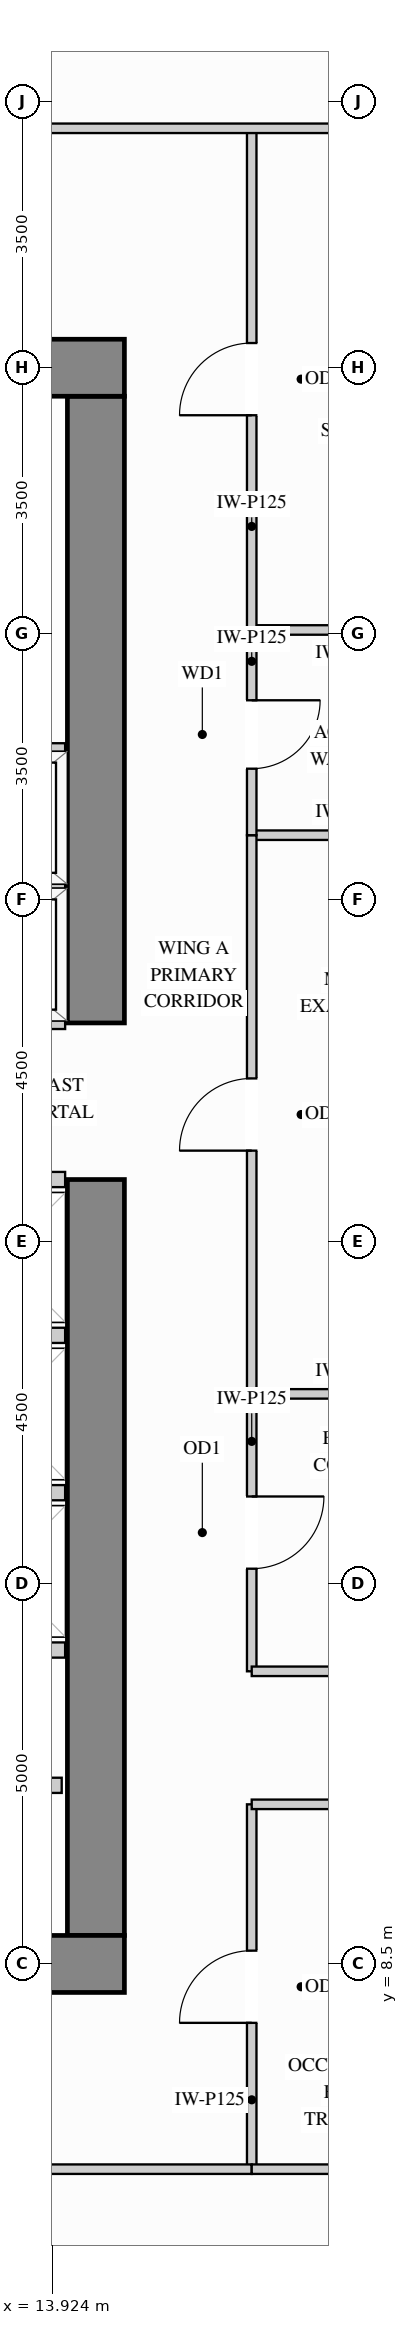
"""IFC4 building model, lengths in metres.
Left out: names, types, materials, properties, quantities, classifications, styles, units other than length and angle.
Written with IfcOpenShell. Run it as: python <this file> out.ifc"""

import sys

from ifc_helpers import new_model, si_unit, direction, frame, frame_2d, origin, place, context, subcontext, project, spatial, rectangle, extrude, source, transform, mapped, element, fill, save


model = new_model("IFC4")
c1 = context("Model", 3, precision=1e-05, world=origin(), true_north=direction((0.0, 1.0)))
c2 = subcontext(c1, "Body", "Model", "MODEL_VIEW")
j1 = project(units=[si_unit("LENGTHUNIT", "METRE"), si_unit("PLANEANGLEUNIT", "RADIAN")], contexts=[c1])
p1 = place(None, origin())
s1 = spatial("IfcSite", under=j1, at=p1, CompositionType="ELEMENT")
p2 = place(p1, origin())
s2 = spatial("IfcBuilding", under=s1, at=p2, CompositionType="ELEMENT")
p3 = place(p2, frame((0.0, 0.0, 117.0)))
s3 = spatial("IfcBuildingStorey", under=s2, at=p3, CompositionType="ELEMENT", Elevation=117.0)
m1 = source(origin(), c2, "Body", "SweptSolid", [
    extrude(rectangle(XDim=9.945, YDim=0.75, at=frame_2d((4.973, 0.0))), origin(), (0.0, 0.0, 1.0), 3.38),
])
p4 = place(p3, frame((14.5, 8.875, 0.0), z_axis=(0.0, 0.0, 1.0), x_axis=(0.0, 1.0, 0.0)))
e1 = element("IfcWall", 1, at=p4, inside=s3, PredefinedType="SHEAR", context=c2, shape_type="MappedRepresentation", body=[
    mapped(m1, transform((0.0, 0.0, 0.0), x_axis=(1.0, 0.0, 0.0), y_axis=(0.0, 1.0, 0.0), z_axis=(0.0, 0.0, 1.0))),
])
m2 = source(origin(), c2, "Body", "SweptSolid", [
    extrude(rectangle(XDim=8.245, YDim=0.75, at=frame_2d((4.123, 0.0))), origin(), (0.0, 0.0, 1.0), 3.38),
])
p5 = place(p3, frame((14.5, 20.88, 0.0), z_axis=(0.0, 0.0, 1.0), x_axis=(0.0, 1.0, 0.0)))
e2 = element("IfcWall", 2, at=p5, inside=s3, PredefinedType="SHEAR", context=c2, shape_type="MappedRepresentation", body=[
    mapped(m2, transform((0.0, 0.0, 0.0), x_axis=(1.0, 0.0, 0.0), y_axis=(0.0, 1.0, 0.0), z_axis=(0.0, 0.0, 1.0))),
])
m3 = source(origin(), c2, "Body", "SweptSolid", [
    extrude(rectangle(XDim=10.75, YDim=0.75, at=frame_2d((5.375, 0.0))), origin(), (0.0, 0.0, 1.0), 3.38),
])
for number, where, z_axis, x_axis in (
    (3, (4.125, 29.5, 0.0), (0.0, 0.0, 1.0), (1.0, 0.0, 0.0)),
    (4, (4.125, 8.5, 0.0), (0.0, 0.0, 1.0), (1.0, 0.0, 0.0)),
):
    element("IfcWall", number, at=place(p3, frame(where, z_axis=z_axis, x_axis=x_axis)), inside=s3, PredefinedType="SHEAR", context=c2, shape_type="MappedRepresentation", body=[
        mapped(m3, transform((0.0, 0.0, 0.0), x_axis=(1.0, 0.0, 0.0), y_axis=(0.0, 1.0, 0.0), z_axis=(0.0, 0.0, 1.0))),
    ])
m4 = source(origin(), c2, "Body", "SweptSolid", [
    extrude(rectangle(XDim=2.6, YDim=0.125, at=frame_2d((1.3, 0.0))), origin(), (0.0, 0.0, 1.0), 3.365),
])
p6 = place(p3, frame((16.55, 16.0, 0.0), z_axis=(0.0, 0.0, 1.0), x_axis=(1.0, 0.0, 0.0)))
e5 = element("IfcWall", 5, at=p6, inside=s3, PredefinedType="PARTITIONING", context=c2, shape_type="MappedRepresentation", body=[
    mapped(m4, transform((0.0, 0.0, 0.0), x_axis=(1.0, 0.0, 0.0), y_axis=(0.0, 1.0, 0.0), z_axis=(0.0, 0.0, 1.0))),
])
m5 = source(origin(), c2, "Body", "SweptSolid", [
    extrude(rectangle(XDim=2.598, YDim=0.125, at=frame_2d((1.299, 0.0))), origin(), (0.0, 0.0, 1.0), 3.365),
])
for number, where, z_axis, x_axis in (
    (6, (16.55, 23.35, 0.0), (0.0, 0.0, 1.0), (1.0, 0.0, 0.0)),
    (7, (16.55, 26.05, 0.0), (0.0, 0.0, 1.0), (1.0, 0.0, 0.0)),
):
    element("IfcWall", number, at=place(p3, frame(where, z_axis=z_axis, x_axis=x_axis)), inside=s3, PredefinedType="PARTITIONING", context=c2, shape_type="MappedRepresentation", body=[
        mapped(m5, transform((0.0, 0.0, 0.0), x_axis=(1.0, 0.0, 0.0), y_axis=(0.0, 1.0, 0.0), z_axis=(0.0, 0.0, 1.0))),
    ])
p7 = place(p3, frame((16.55, 12.35, 0.0), z_axis=(0.0, 0.0, 1.0), x_axis=(0.0, 1.0, 0.0)))
e8 = element("IfcWall", 8, at=p7, inside=s3, PredefinedType="PARTITIONING", context=c2, shape_type="SweptSolid", body=[
    extrude(rectangle(XDim=3.65, YDim=0.125, at=frame_2d((1.825, 0.0))), origin(), (0.0, 0.0, 1.0), 3.365),
])
p8 = place(p7, frame((1.35, 0.0, 0.0)))
e9 = element("IfcOpeningElement", 9, at=p8, cuts=e8, PredefinedType="OPENING", context=c2, shape_type="SweptSolid", body=[
    extrude(rectangle(XDim=0.95, YDim=2.15, at=frame_2d((0.475, 1.075))), frame((0.0, 0.073, 0.0), z_axis=(0.0, -1.0, 0.0), x_axis=(1.0, 0.0, 0.0)), (0.0, 0.0, 1.0), 0.145),
])
p9 = place(p3, frame((16.55, 16.0, 0.0), z_axis=(0.0, 0.0, 1.0), x_axis=(0.0, 1.0, 0.0)))
e10 = element("IfcWall", 10, at=p9, inside=s3, PredefinedType="PARTITIONING", context=c2, shape_type="SweptSolid", body=[
    extrude(rectangle(XDim=7.35, YDim=0.125, at=frame_2d((3.675, 0.0))), origin(), (0.0, 0.0, 1.0), 3.365),
])
p10 = place(p9, frame((3.2, 0.0, 0.0)))
e11 = element("IfcOpeningElement", 11, at=p10, cuts=e10, PredefinedType="OPENING", context=c2, shape_type="SweptSolid", body=[
    extrude(rectangle(XDim=0.95, YDim=2.15, at=frame_2d((0.475, 1.075))), frame((0.0, 0.073, 0.0), z_axis=(0.0, -1.0, 0.0), x_axis=(1.0, 0.0, 0.0)), (0.0, 0.0, 1.0), 0.145),
])
p11 = place(p3, frame((16.55, 26.05, 0.0), z_axis=(0.0, 0.0, 1.0), x_axis=(0.0, 1.0, 0.0)))
e12 = element("IfcWall", 12, at=p11, inside=s3, PredefinedType="PARTITIONING", context=c2, shape_type="SweptSolid", body=[
    extrude(rectangle(XDim=6.6, YDim=0.125, at=frame_2d((3.3, 0.0))), origin(), (0.0, 0.0, 1.0), 3.365),
])
p12 = place(p11, frame((2.825, 0.0, 0.0)))
e13 = element("IfcOpeningElement", 13, at=p12, cuts=e12, PredefinedType="OPENING", context=c2, shape_type="SweptSolid", body=[
    extrude(rectangle(XDim=0.95, YDim=2.15, at=frame_2d((0.475, 1.075))), frame((0.0, 0.073, 0.0), z_axis=(0.0, -1.0, 0.0), x_axis=(1.0, 0.0, 0.0)), (0.0, 0.0, 1.0), 0.145),
])
p13 = place(p3, frame((16.55, 5.8, 0.0), z_axis=(0.0, 0.0, 1.0), x_axis=(0.0, 1.0, 0.0)))
e14 = element("IfcWall", 14, at=p13, inside=s3, PredefinedType="PARTITIONING", context=c2, shape_type="SweptSolid", body=[
    extrude(rectangle(XDim=4.8, YDim=0.125, at=frame_2d((2.4, 0.0))), origin(), (0.0, 0.0, 1.0), 3.365),
])
p14 = place(p13, frame((1.925, 0.0, 0.0)))
e15 = element("IfcOpeningElement", 15, at=p14, cuts=e14, PredefinedType="OPENING", context=c2, shape_type="SweptSolid", body=[
    extrude(rectangle(XDim=0.95, YDim=2.15, at=frame_2d((0.475, 1.075))), frame((0.0, 0.073, 0.0), z_axis=(0.0, -1.0, 0.0), x_axis=(1.0, 0.0, 0.0)), (0.0, 0.0, 1.0), 0.145),
])
p15 = place(p3, frame((16.55, 23.35, 0.0), z_axis=(0.0, 0.0, 1.0), x_axis=(0.0, 1.0, 0.0)))
e16 = element("IfcWall", 16, at=p15, inside=s3, PredefinedType="PARTITIONING", context=c2, shape_type="SweptSolid", body=[
    extrude(rectangle(XDim=2.7, YDim=0.125, at=frame_2d((1.35, 0.0))), origin(), (0.0, 0.0, 1.0), 3.365),
])
p16 = place(p15, frame((0.875, 0.0, 0.0)))
e17 = element("IfcOpeningElement", 17, at=p16, cuts=e16, PredefinedType="OPENING", context=c2, shape_type="SweptSolid", body=[
    extrude(rectangle(XDim=0.9, YDim=2.15, at=frame_2d((0.45, 1.075))), frame((0.0, 0.073, 0.0), z_axis=(0.0, -1.0, 0.0), x_axis=(1.0, 0.0, 0.0)), (0.0, 0.0, 1.0), 0.145),
])
m6 = source(origin(), c2, "Body", "SweptSolid", [
    extrude(rectangle(XDim=5.798, YDim=0.125, at=frame_2d((2.899, 0.0))), origin(), (0.0, 0.0, 1.0), 3.365),
])
p17 = place(p3, frame((13.35, 32.65, 0.0), z_axis=(0.0, 0.0, 1.0), x_axis=(1.0, 0.0, 0.0)))
e18 = element("IfcWall", 18, at=p17, inside=s3, PredefinedType="PARTITIONING", context=c2, shape_type="MappedRepresentation", body=[
    mapped(m6, transform((0.0, 0.0, 0.0), x_axis=(1.0, 0.0, 0.0), y_axis=(0.0, 1.0, 0.0), z_axis=(0.0, 0.0, 1.0))),
])
m7 = source(origin(), c2, "Body", "SweptSolid", [
    extrude(rectangle(XDim=2.95, YDim=0.125, at=frame_2d((1.475, 0.0))), origin(), (0.0, 0.0, 1.0), 3.365),
])
for number, where, z_axis, x_axis in (
    (19, (16.55, 12.35, 0.0), (0.0, 0.0, 1.0), (1.0, 0.0, 0.0)),
    (20, (16.55, 10.6, 0.0), (0.0, 0.0, 1.0), (1.0, 0.0, 0.0)),
):
    element("IfcWall", number, at=place(p3, frame(where, z_axis=z_axis, x_axis=x_axis)), inside=s3, PredefinedType="PARTITIONING", context=c2, shape_type="MappedRepresentation", body=[
        mapped(m7, transform((0.0, 0.0, 0.0), x_axis=(1.0, 0.0, 0.0), y_axis=(0.0, 1.0, 0.0), z_axis=(0.0, 0.0, 1.0))),
    ])
p18 = place(p3, frame((9.882, 5.8, 0.0), z_axis=(0.0, 0.0, 1.0), x_axis=(1.0, 0.0, 0.0)))
e21 = element("IfcWall", 21, at=p18, inside=s3, PredefinedType="PARTITIONING", context=c2, shape_type="SweptSolid", body=[
    extrude(rectangle(XDim=6.668, YDim=0.125, at=frame_2d((3.334, 0.0))), origin(), (0.0, 0.0, 1.0), 3.365),
])
p19 = place(p18, frame((2.859, 0.0, 0.0)))
e22 = element("IfcOpeningElement", 22, at=p19, cuts=e21, PredefinedType="OPENING", context=c2, shape_type="SweptSolid", body=[
    extrude(rectangle(XDim=0.95, YDim=2.15, at=frame_2d((0.475, 1.075))), frame((0.0, 0.073, 0.0), z_axis=(0.0, -1.0, 0.0), x_axis=(1.0, 0.0, 0.0)), (0.0, 0.0, 1.0), 0.145),
])
p20 = place(p3, frame((16.55, 5.8, 0.0), z_axis=(0.0, 0.0, 1.0), x_axis=(1.0, 0.0, 0.0)))
e23 = element("IfcWall", 23, at=p20, inside=s3, PredefinedType="PARTITIONING", context=c2, shape_type="MappedRepresentation", body=[
    mapped(m5, transform((0.0, 0.0, 0.0), x_axis=(1.0, 0.0, 0.0), y_axis=(0.0, 1.0, 0.0), z_axis=(0.0, 0.0, 1.0))),
])
m8 = source(origin(), c2, "Body", "SweptSolid", [
    extrude(rectangle(XDim=1.63, YDim=0.2, at=frame_2d((0.815, 0.0))), origin(), (0.0, 0.0, 1.0), 3.365),
])
p21 = place(p3, frame((12.42, 10.85, 0.0), z_axis=(0.0, 0.0, 1.0), x_axis=(1.0, 0.0, 0.0)))
e24 = element("IfcWall", 24, at=p21, inside=s3, PredefinedType="PARTITIONING", context=c2, shape_type="MappedRepresentation", body=[
    mapped(m8, transform((0.0, 0.0, 0.0), x_axis=(1.0, 0.0, 0.0), y_axis=(0.0, 1.0, 0.0), z_axis=(0.0, 0.0, 1.0))),
])
m9 = source(origin(), c2, "Body", "SweptSolid", [
    extrude(rectangle(XDim=2.265, YDim=0.2, at=frame_2d((1.132, 0.0))), origin(), (0.0, 0.0, 1.0), 3.365),
])
for number, where, z_axis, x_axis in (
    (25, (11.83, 22.66, 0.0), (0.0, 0.0, 1.0), (1.0, 0.0, 0.0)),
    (26, (11.83, 20.9, 0.0), (0.0, 0.0, 1.0), (1.0, 0.0, 0.0)),
    (27, (11.83, 24.46, 0.0), (0.0, 0.0, 1.0), (1.0, 0.0, 0.0)),
):
    element("IfcWall", number, at=place(p3, frame(where, z_axis=z_axis, x_axis=x_axis)), inside=s3, PredefinedType="PARTITIONING", context=c2, shape_type="MappedRepresentation", body=[
        mapped(m9, transform((0.0, 0.0, 0.0), x_axis=(1.0, 0.0, 0.0), y_axis=(0.0, 1.0, 0.0), z_axis=(0.0, 0.0, 1.0))),
    ])
m10 = source(origin(), c2, "Body", "SweptSolid", [
    extrude(rectangle(XDim=1.865, YDim=0.2, at=frame_2d((0.933, 0.0))), origin(), (0.0, 0.0, 1.0), 3.365),
])
for number, where, z_axis, x_axis in (
    (28, (12.23, 14.7, 0.0), (0.0, 0.0, 1.0), (1.0, 0.0, 0.0)),
    (29, (12.23, 12.63, 0.0), (0.0, 0.0, 1.0), (1.0, 0.0, 0.0)),
    (30, (12.23, 16.77, 0.0), (0.0, 0.0, 1.0), (1.0, 0.0, 0.0)),
    (31, (12.23, 18.82, 0.0), (0.0, 0.0, 1.0), (1.0, 0.0, 0.0)),
):
    element("IfcWall", number, at=place(p3, frame(where, z_axis=z_axis, x_axis=x_axis)), inside=s3, PredefinedType="PARTITIONING", context=c2, shape_type="MappedRepresentation", body=[
        mapped(m10, transform((0.0, 0.0, 0.0), x_axis=(1.0, 0.0, 0.0), y_axis=(0.0, 1.0, 0.0), z_axis=(0.0, 0.0, 1.0))),
    ])
m11 = source(origin(), c2, "Body", "SweptSolid", [
    extrude(rectangle(XDim=0.95, YDim=2.15, at=frame_2d((0.475, 1.075))), frame((0.0, 0.025, 0.0), z_axis=(0.0, -1.0, 0.0), x_axis=(1.0, 0.0, 0.0)), (0.0, 0.0, 1.0), 0.05),
])
p22 = place(p14, origin())
e32 = element("IfcDoor", 32, at=p22, inside=s3, OperationType="SINGLE_SWING_LEFT", PredefinedType="DOOR", context=c2, shape_type="MappedRepresentation", body=[
    mapped(m11, transform((0.0, 0.0, 0.0), x_axis=(1.0, 0.0, 0.0), y_axis=(0.0, 1.0, 0.0), z_axis=(0.0, 0.0, 1.0))),
])
fill(e15, e32)
p23 = place(p8, origin())
e33 = element("IfcDoor", 33, at=p23, inside=s3, OperationType="SINGLE_SWING_RIGHT", PredefinedType="DOOR", context=c2, shape_type="MappedRepresentation", body=[
    mapped(m11, transform((0.0, 0.0, 0.0), x_axis=(1.0, 0.0, 0.0), y_axis=(0.0, 1.0, 0.0), z_axis=(0.0, 0.0, 1.0))),
])
fill(e9, e33)
p24 = place(p10, origin())
e34 = element("IfcDoor", 34, at=p24, inside=s3, OperationType="SINGLE_SWING_LEFT", PredefinedType="DOOR", context=c2, shape_type="MappedRepresentation", body=[
    mapped(m11, transform((0.0, 0.0, 0.0), x_axis=(1.0, 0.0, 0.0), y_axis=(0.0, 1.0, 0.0), z_axis=(0.0, 0.0, 1.0))),
])
fill(e11, e34)
p25 = place(p12, origin())
e35 = element("IfcDoor", 35, at=p25, inside=s3, OperationType="SINGLE_SWING_LEFT", PredefinedType="DOOR", context=c2, shape_type="MappedRepresentation", body=[
    mapped(m11, transform((0.0, 0.0, 0.0), x_axis=(1.0, 0.0, 0.0), y_axis=(0.0, 1.0, 0.0), z_axis=(0.0, 0.0, 1.0))),
])
fill(e13, e35)
m12 = source(origin(), c2, "Body", "SweptSolid", [
    extrude(rectangle(XDim=0.9, YDim=2.15, at=frame_2d((0.45, 1.075))), frame((0.0, 0.025, 0.0), z_axis=(0.0, -1.0, 0.0), x_axis=(1.0, 0.0, 0.0)), (0.0, 0.0, 1.0), 0.05),
])
p26 = place(p16, origin())
e36 = element("IfcDoor", 36, at=p26, inside=s3, OperationType="SINGLE_SWING_RIGHT", PredefinedType="DOOR", context=c2, shape_type="MappedRepresentation", body=[
    mapped(m12, transform((0.0, 0.0, 0.0), x_axis=(1.0, 0.0, 0.0), y_axis=(0.0, 1.0, 0.0), z_axis=(0.0, 0.0, 1.0))),
])
fill(e17, e36)
save(model, sys.argv[1])
